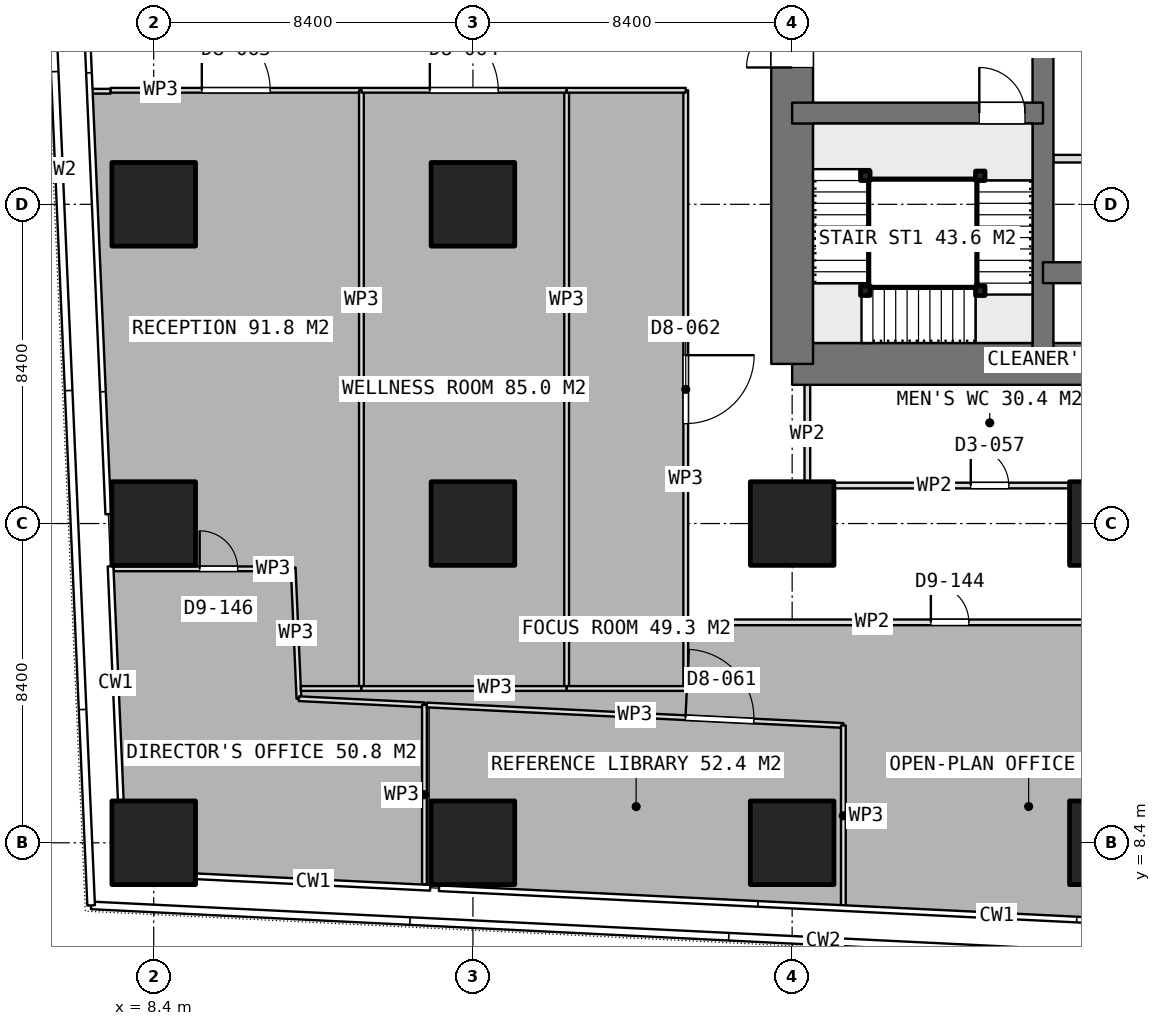
"""IFC4 building model, lengths in metres.
Left out: names, types, materials, properties, quantities, classifications, styles, units other than length and angle.
Written with IfcOpenShell. Run it as: python <this file> out.ifc"""

import sys

from ifc_helpers import new_model, si_unit, direction, frame, frame_2d, origin, origin_2d, place, context, subcontext, project, spatial, rectangle, extrude, element, fill, save


model = new_model("IFC4")
c1 = context("Model", 3, precision=1e-05, world=origin(), true_north=direction((0.0, 1.0)))
c2 = subcontext(c1, "Body", "Model", "MODEL_VIEW")
j1 = project(units=[si_unit("LENGTHUNIT", "METRE"), si_unit("PLANEANGLEUNIT", "RADIAN")], contexts=[c1])
p1 = place(None, origin())
s1 = spatial("IfcSite", under=j1, at=p1, CompositionType="ELEMENT")
p2 = place(p1, origin())
s2 = spatial("IfcBuilding", under=s1, at=p2, CompositionType="ELEMENT")
p3 = place(p2, frame((0.0, 0.0, 51.65)))
s3 = spatial("IfcBuildingStorey", under=s2, at=p3, CompositionType="ELEMENT", Elevation=51.65)
p4 = place(p3, frame((25.2, 21.0, 0.0), z_axis=(0.0, 0.0, 1.0), x_axis=(1.0, 0.0, 0.0)))
e1 = element("IfcWall", 1, at=p4, inside=s3, PredefinedType="SHEAR", context=c2, shape_type="SweptSolid", body=[
    extrude(rectangle(XDim=10.4, YDim=1.1, at=frame_2d((5.2, 0.0))), origin(), (0.0, 0.0, 1.0), 3.75),
])
p5 = place(p3, frame((25.2, 21.0, 0.0), z_axis=(0.0, 0.0, 1.0), x_axis=(0.0, 1.0, 0.0)))
e2 = element("IfcWall", 2, at=p5, inside=s3, PredefinedType="SHEAR", context=c2, shape_type="SweptSolid", body=[
    extrude(rectangle(XDim=25.2, YDim=1.1, at=frame_2d((12.6, 0.0))), origin(), (0.0, 0.0, 1.0), 3.75),
])
p6 = place(p5, frame((7.8, 0.0, 0.0)))
e3 = element("IfcOpeningElement", 3, at=p6, cuts=e2, PredefinedType="OPENING", context=c2, shape_type="SweptSolid", body=[
    extrude(rectangle(XDim=1.2, YDim=2.1, at=frame_2d((0.6, 1.05))), frame((0.0, 0.56, 0.0), z_axis=(0.0, -1.0, 0.0), x_axis=(1.0, 0.0, 0.0)), (0.0, 0.0, 1.0), 1.12),
])
p7 = place(p5, frame((14.25, 0.0, 0.0)))
e4 = element("IfcOpeningElement", 4, at=p7, cuts=e2, PredefinedType="OPENING", context=c2, shape_type="SweptSolid", body=[
    extrude(rectangle(XDim=0.9, YDim=2.1, at=frame_2d((0.45, 1.05))), frame((0.0, 0.56, 0.0), z_axis=(0.0, -1.0, 0.0), x_axis=(1.0, 0.0, 0.0)), (0.0, 0.0, 1.0), 1.12),
])
p8 = place(p5, frame((16.85, 0.0, 0.0)))
e5 = element("IfcOpeningElement", 5, at=p8, cuts=e2, PredefinedType="OPENING", context=c2, shape_type="SweptSolid", body=[
    extrude(rectangle(XDim=0.9, YDim=2.1, at=frame_2d((0.45, 1.05))), frame((0.0, 0.56, 0.0), z_axis=(0.0, -1.0, 0.0), x_axis=(1.0, 0.0, 0.0)), (0.0, 0.0, 1.0), 1.12),
])
p9 = place(p5, frame((19.075, 0.0, 0.0)))
e6 = element("IfcOpeningElement", 6, at=p9, cuts=e2, PredefinedType="OPENING", context=c2, shape_type="SweptSolid", body=[
    extrude(rectangle(XDim=1.2, YDim=2.1, at=frame_2d((0.6, 1.05))), frame((0.0, 0.56, 0.0), z_axis=(0.0, -1.0, 0.0), x_axis=(1.0, 0.0, 0.0)), (0.0, 0.0, 1.0), 1.12),
])
p10 = place(p3, frame((31.8, 21.0, 0.0), z_axis=(0.0, 0.0, 1.0), x_axis=(0.0, 1.0, 0.0)))
e7 = element("IfcWall", 7, at=p10, inside=s3, PredefinedType="SHEAR", context=c2, shape_type="SweptSolid", body=[
    extrude(rectangle(XDim=25.2, YDim=0.55, at=frame_2d((12.6, 0.0))), origin(), (0.0, 0.0, 1.0), 3.75),
])
p11 = place(p3, frame((31.8, 23.4, 0.0), z_axis=(0.0, 0.0, 1.0), x_axis=(1.0, 0.0, 0.0)))
e8 = element("IfcWall", 8, at=p11, inside=s3, PredefinedType="SHEAR", context=c2, shape_type="SweptSolid", body=[
    extrude(rectangle(XDim=3.8, YDim=0.55, at=frame_2d((1.9, 0.0))), origin(), (0.0, 0.0, 1.0), 3.75),
])
p12 = place(p3, frame((25.2, 27.6, 0.0), z_axis=(0.0, 0.0, 1.0), x_axis=(1.0, 0.0, 0.0)))
e9 = element("IfcWall", 9, at=p12, inside=s3, PredefinedType="SHEAR", context=c2, shape_type="SweptSolid", body=[
    extrude(rectangle(XDim=6.6, YDim=0.55, at=frame_2d((3.3, 0.0))), origin(), (0.0, 0.0, 1.0), 3.75),
])
p13 = place(p12, frame((4.925, 0.0, 0.0)))
e10 = element("IfcOpeningElement", 10, at=p13, cuts=e9, PredefinedType="OPENING", context=c2, shape_type="SweptSolid", body=[
    extrude(rectangle(XDim=1.2, YDim=2.1, at=frame_2d((0.6, 1.05))), frame((0.0, 0.285, 0.0), z_axis=(0.0, -1.0, 0.0), x_axis=(1.0, 0.0, 0.0)), (0.0, 0.0, 1.0), 0.57),
])
for number, where, z_axis, x_axis in (
    (11, (8.4, 8.4, 0.0), (0.0, 0.0, 1.0), (1.0, 0.0, 0.0)),
    (12, (8.4, 16.8, 0.0), (0.0, 0.0, 1.0), (1.0, 0.0, 0.0)),
    (13, (8.4, 25.2, 0.0), (0.0, 0.0, 1.0), (1.0, 0.0, 0.0)),
    (14, (16.8, 8.4, 0.0), (0.0, 0.0, 1.0), (1.0, 0.0, 0.0)),
    (15, (16.8, 16.8, 0.0), (0.0, 0.0, 1.0), (1.0, 0.0, 0.0)),
    (16, (16.8, 25.2, 0.0), (0.0, 0.0, 1.0), (1.0, 0.0, 0.0)),
    (17, (25.2, 8.4, 0.0), (0.0, 0.0, 1.0), (1.0, 0.0, 0.0)),
    (18, (25.2, 16.8, 0.0), (0.0, 0.0, 1.0), (1.0, 0.0, 0.0)),
    (19, (33.6, 8.4, 0.0), (0.0, 0.0, 1.0), (1.0, 0.0, 0.0)),
    (20, (33.6, 16.8, 0.0), (0.0, 0.0, 1.0), (1.0, 0.0, 0.0)),
):
    element("IfcColumn", number, at=place(p3, frame(where, z_axis=z_axis, x_axis=x_axis)), inside=s3, PredefinedType="COLUMN", context=c2, shape_type="SweptSolid", body=[
        extrude(rectangle(XDim=2.2, YDim=2.2, at=origin_2d()), origin(), (0.0, 0.0, 1.0), 3.75),
    ])
p14 = place(p3, frame((32.075, 26.4, 0.0), z_axis=(0.0, 0.0, 1.0), x_axis=(1.0, 0.0, 0.0)))
e21 = element("IfcWall", 21, at=p14, inside=s3, PredefinedType="PARTITIONING", context=c2, shape_type="SweptSolid", body=[
    extrude(rectangle(XDim=3.25, YDim=0.2, at=frame_2d((1.625, 0.0))), origin(), (0.0, 0.0, 1.0), 3.5),
])
p15 = place(p3, frame((25.525, 17.8, 0.0), z_axis=(0.0, 0.0, 1.0), x_axis=(1.0, 0.0, 0.0)))
e22 = element("IfcWall", 22, at=p15, inside=s3, PredefinedType="PARTITIONING", context=c2, shape_type="SweptSolid", body=[
    extrude(rectangle(XDim=9.75, YDim=0.15, at=frame_2d((4.875, 0.0))), origin(), (0.0, 0.0, 1.0), 3.5),
])
p16 = place(p15, frame((4.375, 0.0, 0.0)))
e23 = element("IfcOpeningElement", 23, at=p16, cuts=e22, PredefinedType="OPENING", context=c2, shape_type="SweptSolid", body=[
    extrude(rectangle(XDim=1.0, YDim=2.1, at=frame_2d((0.5, 1.05))), frame((0.0, 0.085, 0.0), z_axis=(0.0, -1.0, 0.0), x_axis=(1.0, 0.0, 0.0)), (0.0, 0.0, 1.0), 0.17),
])
p17 = place(p3, frame((25.6, 17.875, 0.0), z_axis=(0.0, 0.0, 1.0), x_axis=(0.0, 1.0, 0.0)))
e24 = element("IfcWall", 24, at=p17, inside=s3, PredefinedType="PARTITIONING", context=c2, shape_type="SweptSolid", body=[
    extrude(rectangle(XDim=2.575, YDim=0.15, at=frame_2d((1.288, 0.0))), origin(), (0.0, 0.0, 1.0), 3.5),
])
p18 = place(p3, frame((7.347, 15.608, 0.0), z_axis=(0.0, 0.0, 1.0), x_axis=(1.0, 0.0, 0.0)))
e25 = element("IfcWall", 25, at=p18, inside=s3, PredefinedType="PARTITIONING", context=c2, shape_type="SweptSolid", body=[
    extrude(rectangle(XDim=4.662, YDim=0.125, at=frame_2d((2.331, 0.0))), origin(), (0.0, 0.0, 1.0), 3.5),
])
p19 = place(p18, frame((2.262, 0.0, 0.0)))
e26 = element("IfcOpeningElement", 26, at=p19, cuts=e25, PredefinedType="OPENING", context=c2, shape_type="SweptSolid", body=[
    extrude(rectangle(XDim=1.0, YDim=2.1, at=frame_2d((0.5, 1.05))), frame((0.0, 0.073, 0.0), z_axis=(0.0, -1.0, 0.0), x_axis=(1.0, 0.0, 0.0)), (0.0, 0.0, 1.0), 0.145),
])
p20 = place(p3, frame((12.07, 15.643, 0.0), z_axis=(0.0, 0.0, 1.0), x_axis=(0.043664115519, -0.999046267705, 0.0)))
e27 = element("IfcWall", 27, at=p20, inside=s3, PredefinedType="PARTITIONING", context=c2, shape_type="SweptSolid", body=[
    extrude(rectangle(XDim=3.455, YDim=0.125, at=frame_2d((1.728, 0.0))), origin(), (0.0, 0.0, 1.0), 3.5),
])
p21 = place(p3, frame((12.221, 12.191, 0.0), z_axis=(0.0, 0.0, 1.0), x_axis=(0.998801372368, -0.048947099555, 0.0)))
e28 = element("IfcWall", 28, at=p21, inside=s3, PredefinedType="PARTITIONING", context=c2, shape_type="SweptSolid", body=[
    extrude(rectangle(XDim=3.307, YDim=0.125, at=frame_2d((1.653, 0.0))), origin(), (0.0, 0.0, 1.0), 3.5),
])
p22 = place(p3, frame((15.524, 12.029, 0.0), z_axis=(0.0, 0.0, 1.0), x_axis=(0.0, -1.0, 0.0)))
e29 = element("IfcWall", 29, at=p22, inside=s3, PredefinedType="PARTITIONING", context=c2, shape_type="SweptSolid", body=[
    extrude(rectangle(XDim=4.726, YDim=0.125, at=frame_2d((2.363, 0.0))), origin(), (0.0, 0.0, 1.0), 3.5),
])
p23 = place(p3, frame((15.586, 12.026, 0.0), z_axis=(0.0, 0.0, 1.0), x_axis=(0.998793981911, -0.04909767508, 0.0)))
e30 = element("IfcWall", 30, at=p23, inside=s3, PredefinedType="PARTITIONING", context=c2, shape_type="SweptSolid", body=[
    extrude(rectangle(XDim=10.974, YDim=0.125, at=frame_2d((5.487, 0.0))), origin(), (0.0, 0.0, 1.0), 3.5),
])
p24 = place(p23, frame((6.815, 0.0, 0.0)))
e31 = element("IfcOpeningElement", 31, at=p24, cuts=e30, PredefinedType="OPENING", context=c2, shape_type="SweptSolid", body=[
    extrude(rectangle(XDim=1.8, YDim=2.1, at=frame_2d((0.9, 1.05))), frame((0.0, 0.073, 0.0), z_axis=(0.0, -1.0, 0.0), x_axis=(1.0, 0.0, 0.0)), (0.0, 0.0, 1.0), 0.145),
])
p25 = place(p3, frame((26.547, 11.487, 0.0), z_axis=(0.0, 0.0, 1.0), x_axis=(0.0, -1.0, 0.0)))
e32 = element("IfcWall", 32, at=p25, inside=s3, PredefinedType="PARTITIONING", context=c2, shape_type="SweptSolid", body=[
    extrude(rectangle(XDim=4.755, YDim=0.125, at=frame_2d((2.377, 0.0))), origin(), (0.0, 0.0, 1.0), 3.5),
])
p26 = place(p3, frame((6.768, 28.175, 0.0), z_axis=(0.0, 0.0, 1.0), x_axis=(1.0, 0.0, 0.0)))
e33 = element("IfcWall", 33, at=p26, inside=s3, PredefinedType="PARTITIONING", context=c2, shape_type="SweptSolid", body=[
    extrude(rectangle(XDim=0.498, YDim=0.125, at=frame_2d((0.249, 0.0))), origin(), (0.0, 0.0, 1.0), 3.5),
])
p27 = place(p3, frame((7.266, 28.2, 0.0), z_axis=(0.0, 0.0, 1.0), x_axis=(1.0, 0.0, 0.0)))
e34 = element("IfcWall", 34, at=p27, inside=s3, PredefinedType="PARTITIONING", context=c2, shape_type="SweptSolid", body=[
    extrude(rectangle(XDim=6.6, YDim=0.125, at=frame_2d((3.3, 0.0))), origin(), (0.0, 0.0, 1.0), 3.5),
])
p28 = place(p27, frame((2.4, 0.0, 0.0)))
e35 = element("IfcOpeningElement", 35, at=p28, cuts=e34, PredefinedType="OPENING", context=c2, shape_type="SweptSolid", body=[
    extrude(rectangle(XDim=1.8, YDim=2.1, at=frame_2d((0.9, 1.05))), frame((0.0, 0.073, 0.0), z_axis=(0.0, -1.0, 0.0), x_axis=(1.0, 0.0, 0.0)), (0.0, 0.0, 1.0), 0.145),
])
p29 = place(p3, frame((13.866, 28.2, 0.0), z_axis=(0.0, 0.0, 1.0), x_axis=(0.0, -1.0, 0.0)))
e36 = element("IfcWall", 36, at=p29, inside=s3, PredefinedType="PARTITIONING", context=c2, shape_type="SweptSolid", body=[
    extrude(rectangle(XDim=15.74, YDim=0.125, at=frame_2d((7.87, 0.0))), origin(), (0.0, 0.0, 1.0), 3.5),
])
p30 = place(p3, frame((13.866, 12.46, 0.0), z_axis=(0.0, 0.0, 1.0), x_axis=(-1.0, 0.0, 0.0)))
e37 = element("IfcWall", 37, at=p30, inside=s3, PredefinedType="PARTITIONING", context=c2, shape_type="SweptSolid", body=[
    extrude(rectangle(XDim=1.594, YDim=0.125, at=frame_2d((0.797, 0.0))), origin(), (0.0, 0.0, 1.0), 3.5),
])
p31 = place(p3, frame((19.266, 28.2, 0.0), z_axis=(0.0, 0.0, 1.0), x_axis=(0.0, -1.0, 0.0)))
e38 = element("IfcWall", 38, at=p31, inside=s3, PredefinedType="PARTITIONING", context=c2, shape_type="SweptSolid", body=[
    extrude(rectangle(XDim=15.74, YDim=0.125, at=frame_2d((7.87, 0.0))), origin(), (0.0, 0.0, 1.0), 3.5),
])
p32 = place(p3, frame((19.266, 12.46, 0.0), z_axis=(0.0, 0.0, 1.0), x_axis=(-1.0, 0.0, 0.0)))
e39 = element("IfcWall", 39, at=p32, inside=s3, PredefinedType="PARTITIONING", context=c2, shape_type="SweptSolid", body=[
    extrude(rectangle(XDim=5.4, YDim=0.125, at=frame_2d((2.7, 0.0))), origin(), (0.0, 0.0, 1.0), 3.5),
])
p33 = place(p3, frame((13.866, 28.2, 0.0), z_axis=(0.0, 0.0, 1.0), x_axis=(1.0, 0.0, 0.0)))
e40 = element("IfcWall", 40, at=p33, inside=s3, PredefinedType="PARTITIONING", context=c2, shape_type="SweptSolid", body=[
    extrude(rectangle(XDim=5.4, YDim=0.125, at=frame_2d((2.7, 0.0))), origin(), (0.0, 0.0, 1.0), 3.5),
])
p34 = place(p33, frame((1.8, 0.0, 0.0)))
e41 = element("IfcOpeningElement", 41, at=p34, cuts=e40, PredefinedType="OPENING", context=c2, shape_type="SweptSolid", body=[
    extrude(rectangle(XDim=1.8, YDim=2.1, at=frame_2d((0.9, 1.05))), frame((0.0, 0.073, 0.0), z_axis=(0.0, -1.0, 0.0), x_axis=(1.0, 0.0, 0.0)), (0.0, 0.0, 1.0), 0.145),
])
p35 = place(p3, frame((22.4, 28.2, 0.0), z_axis=(0.0, 0.0, 1.0), x_axis=(0.0, -1.0, 0.0)))
e42 = element("IfcWall", 42, at=p35, inside=s3, PredefinedType="PARTITIONING", context=c2, shape_type="SweptSolid", body=[
    extrude(rectangle(XDim=15.74, YDim=0.125, at=frame_2d((7.87, 0.0))), origin(), (0.0, 0.0, 1.0), 3.5),
])
p36 = place(p35, frame((6.97, 0.0, 0.0)))
e43 = element("IfcOpeningElement", 43, at=p36, cuts=e42, PredefinedType="OPENING", context=c2, shape_type="SweptSolid", body=[
    extrude(rectangle(XDim=1.8, YDim=2.1, at=frame_2d((0.9, 1.05))), frame((0.0, 0.073, 0.0), z_axis=(0.0, -1.0, 0.0), x_axis=(1.0, 0.0, 0.0)), (0.0, 0.0, 1.0), 0.145),
])
for number, where, z_axis, x_axis in (
    (44, (22.4, 12.46, 0.0), (0.0, 0.0, 1.0), (-1.0, 0.0, 0.0)),
    (45, (19.266, 28.2, 0.0), (0.0, 0.0, 1.0), (1.0, 0.0, 0.0)),
):
    element("IfcWall", number, at=place(p3, frame(where, z_axis=z_axis, x_axis=x_axis)), inside=s3, PredefinedType="PARTITIONING", context=c2, shape_type="SweptSolid", body=[
        extrude(rectangle(XDim=3.134, YDim=0.125, at=frame_2d((1.567, 0.0))), origin(), (0.0, 0.0, 1.0), 3.5),
    ])
p37 = place(p3, frame((22.462, 14.2, 0.0), z_axis=(0.0, 0.0, 1.0), x_axis=(1.0, 0.0, 0.0)))
e46 = element("IfcWall", 46, at=p37, inside=s3, PredefinedType="PARTITIONING", context=c2, shape_type="SweptSolid", body=[
    extrude(rectangle(XDim=13.837, YDim=0.15, at=frame_2d((6.918, 0.0))), origin(), (0.0, 0.0, 1.0), 3.5),
])
p38 = place(p37, frame((6.388, 0.0, 0.0)))
e47 = element("IfcOpeningElement", 47, at=p38, cuts=e46, PredefinedType="OPENING", context=c2, shape_type="SweptSolid", body=[
    extrude(rectangle(XDim=1.0, YDim=2.1, at=frame_2d((0.5, 1.05))), frame((0.0, 0.085, 0.0), z_axis=(0.0, -1.0, 0.0), x_axis=(1.0, 0.0, 0.0)), (0.0, 0.0, 1.0), 0.17),
])
for number, where, z_axis, x_axis in (
    (48, (30.15, 25.95, 0.0), (0.0, 0.0, 1.0), (1.0, 0.0, 0.0)),
    (49, (30.15, 22.925, 0.0), (0.0, 0.0, 1.0), (1.0, 0.0, 0.0)),
    (50, (27.125, 22.925, 0.0), (0.0, 0.0, 1.0), (1.0, 0.0, 0.0)),
    (51, (27.125, 25.95, 0.0), (0.0, 0.0, 1.0), (1.0, 0.0, 0.0)),
):
    element("IfcColumn", number, at=place(p3, frame(where, z_axis=z_axis, x_axis=x_axis)), inside=s3, PredefinedType="COLUMN", context=c2, shape_type="SweptSolid", body=[
        extrude(rectangle(XDim=0.25, YDim=0.25, at=origin_2d()), origin(), (0.0, 0.0, 1.0), 3.75),
    ])
p39 = place(p6, origin())
e52 = element("IfcDoor", 52, at=p39, inside=s3, OperationType="SINGLE_SWING_LEFT", PredefinedType="DOOR", context=c2, shape_type="SweptSolid", body=[
    extrude(rectangle(XDim=1.2, YDim=2.1, at=frame_2d((0.6, 1.05))), frame((0.0, 0.025, 0.0), z_axis=(0.0, -1.0, 0.0), x_axis=(1.0, 0.0, 0.0)), (0.0, 0.0, 1.0), 0.05),
])
fill(e3, e52)
p40 = place(p16, origin())
e53 = element("IfcDoor", 53, at=p40, inside=s3, OperationType="SINGLE_SWING_LEFT", PredefinedType="DOOR", context=c2, shape_type="SweptSolid", body=[
    extrude(rectangle(XDim=1.0, YDim=2.1, at=frame_2d((0.5, 1.05))), frame((0.0, 0.025, 0.0), z_axis=(0.0, -1.0, 0.0), x_axis=(1.0, 0.0, 0.0)), (0.0, 0.0, 1.0), 0.05),
])
fill(e23, e53)
p41 = place(p24, origin())
e54 = element("IfcDoor", 54, at=p41, inside=s3, OperationType="DOUBLE_DOOR_SINGLE_SWING", PredefinedType="DOOR", context=c2, shape_type="SweptSolid", body=[
    extrude(rectangle(XDim=1.8, YDim=2.1, at=frame_2d((0.9, 1.05))), frame((0.0, 0.025, 0.0), z_axis=(0.0, -1.0, 0.0), x_axis=(1.0, 0.0, 0.0)), (0.0, 0.0, 1.0), 0.05),
])
fill(e31, e54)
p42 = place(p28, origin())
e55 = element("IfcDoor", 55, at=p42, inside=s3, OperationType="DOUBLE_DOOR_SINGLE_SWING", PredefinedType="DOOR", context=c2, shape_type="SweptSolid", body=[
    extrude(rectangle(XDim=1.8, YDim=2.1, at=frame_2d((0.9, 1.05))), frame((0.0, 0.025, 0.0), z_axis=(0.0, -1.0, 0.0), x_axis=(1.0, 0.0, 0.0)), (0.0, 0.0, 1.0), 0.05),
])
fill(e35, e55)
p43 = place(p34, origin())
e56 = element("IfcDoor", 56, at=p43, inside=s3, OperationType="DOUBLE_DOOR_SINGLE_SWING", PredefinedType="DOOR", context=c2, shape_type="SweptSolid", body=[
    extrude(rectangle(XDim=1.8, YDim=2.1, at=frame_2d((0.9, 1.05))), frame((0.0, 0.025, 0.0), z_axis=(0.0, -1.0, 0.0), x_axis=(1.0, 0.0, 0.0)), (0.0, 0.0, 1.0), 0.05),
])
fill(e41, e56)
p44 = place(p36, origin())
e57 = element("IfcDoor", 57, at=p44, inside=s3, OperationType="DOUBLE_DOOR_SINGLE_SWING", PredefinedType="DOOR", context=c2, shape_type="SweptSolid", body=[
    extrude(rectangle(XDim=1.8, YDim=2.1, at=frame_2d((0.9, 1.05))), frame((0.0, 0.025, 0.0), z_axis=(0.0, -1.0, 0.0), x_axis=(1.0, 0.0, 0.0)), (0.0, 0.0, 1.0), 0.05),
])
fill(e43, e57)
p45 = place(p38, origin())
e58 = element("IfcDoor", 58, at=p45, inside=s3, OperationType="SINGLE_SWING_LEFT", PredefinedType="DOOR", context=c2, shape_type="SweptSolid", body=[
    extrude(rectangle(XDim=1.0, YDim=2.1, at=frame_2d((0.5, 1.05))), frame((0.0, 0.025, 0.0), z_axis=(0.0, -1.0, 0.0), x_axis=(1.0, 0.0, 0.0)), (0.0, 0.0, 1.0), 0.05),
])
fill(e47, e58)
p46 = place(p19, origin())
e59 = element("IfcDoor", 59, at=p46, inside=s3, OperationType="SINGLE_SWING_LEFT", PredefinedType="DOOR", context=c2, shape_type="SweptSolid", body=[
    extrude(rectangle(XDim=1.0, YDim=2.1, at=frame_2d((0.5, 1.05))), frame((0.0, 0.025, 0.0), z_axis=(0.0, -1.0, 0.0), x_axis=(1.0, 0.0, 0.0)), (0.0, 0.0, 1.0), 0.05),
])
fill(e26, e59)
p47 = place(p13, origin())
e60 = element("IfcDoor", 60, at=p47, inside=s3, OperationType="SINGLE_SWING_RIGHT", PredefinedType="DOOR", context=c2, shape_type="SweptSolid", body=[
    extrude(rectangle(XDim=1.2, YDim=2.1, at=frame_2d((0.6, 1.05))), frame((0.0, 0.025, 0.0), z_axis=(0.0, -1.0, 0.0), x_axis=(1.0, 0.0, 0.0)), (0.0, 0.0, 1.0), 0.05),
])
fill(e10, e60)
save(model, sys.argv[1])
